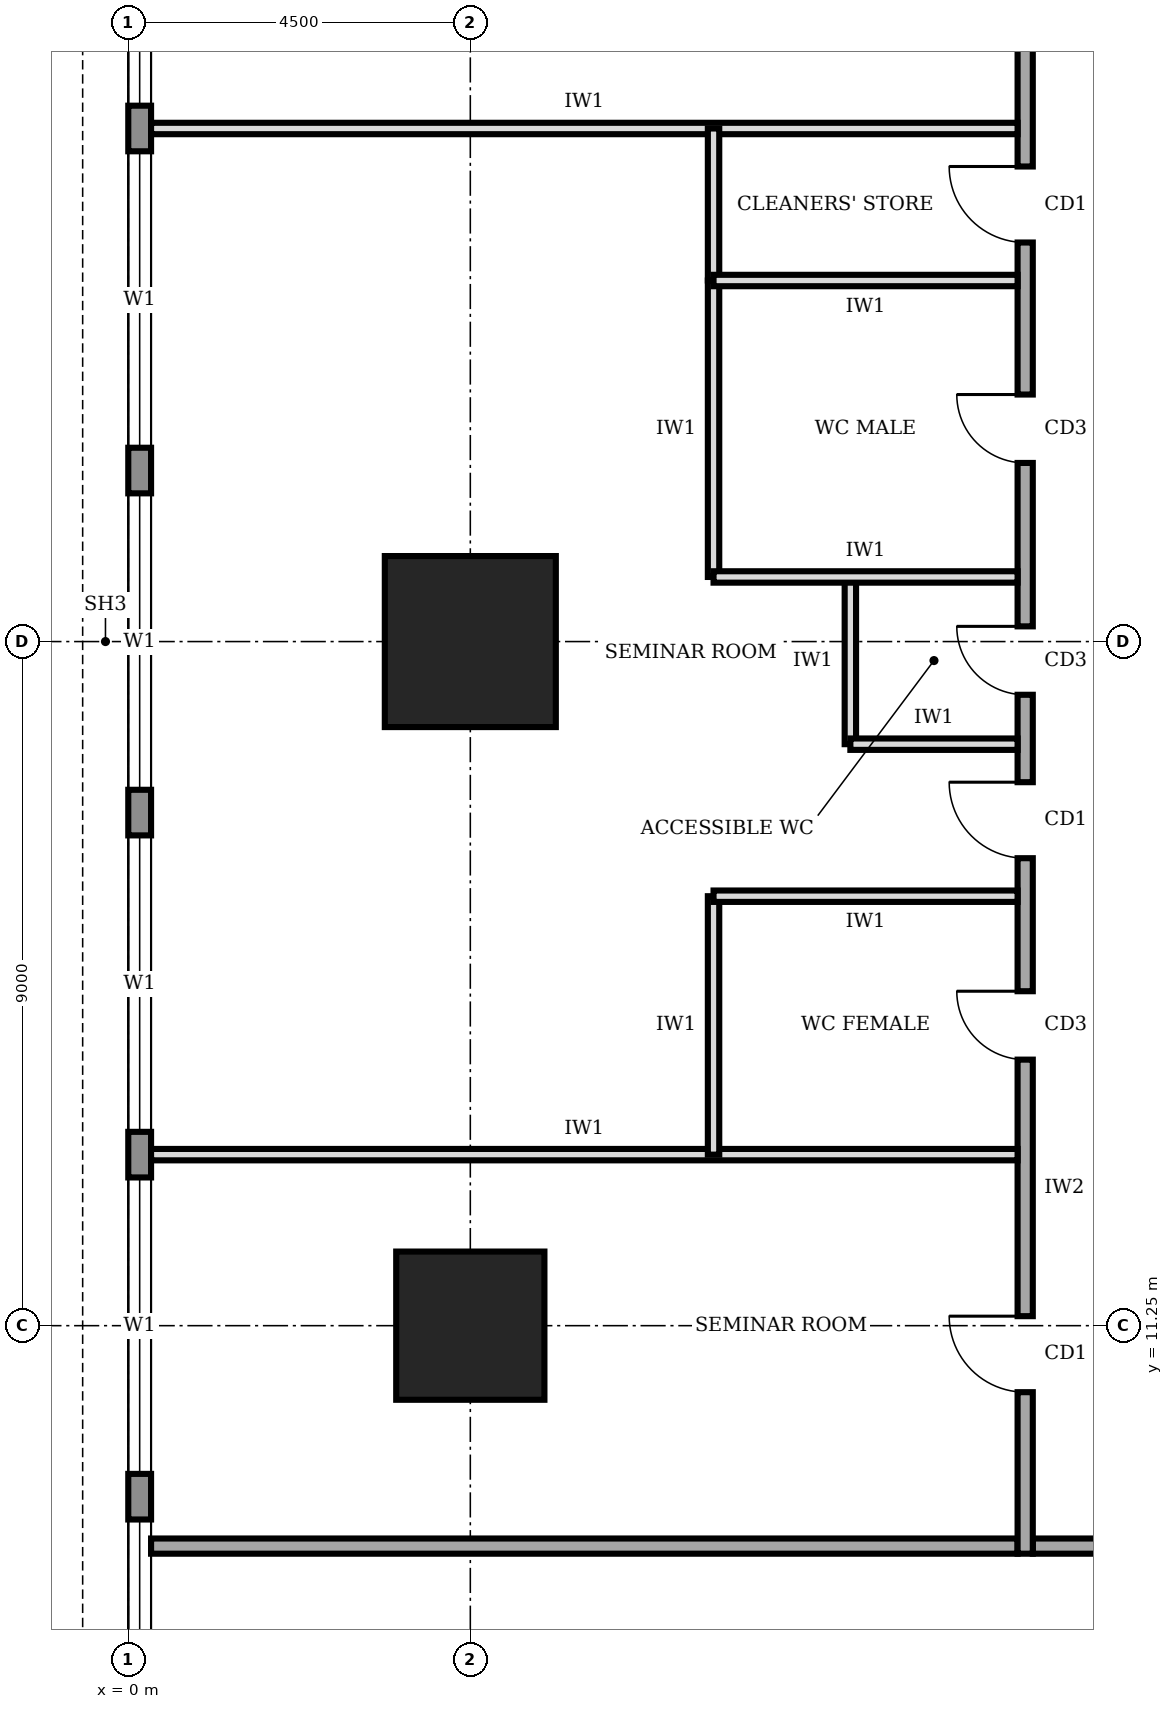
"""IFC4 building model, lengths in metres.
Left out: names, types, materials, properties, quantities, classifications, styles, units other than length and angle.
Written with IfcOpenShell. Run it as: python <this file> out.ifc"""

import sys

from ifc_helpers import new_model, si_unit, direction, frame, frame_2d, origin, origin_2d, place, context, subcontext, project, spatial, rectangle, extrude, element, fill, save


model = new_model("IFC4")
c1 = context("Model", 3, precision=1e-05, world=origin(), true_north=direction((0.0, 1.0)))
c2 = subcontext(c1, "Body", "Model", "MODEL_VIEW")
j1 = project(units=[si_unit("LENGTHUNIT", "METRE"), si_unit("PLANEANGLEUNIT", "RADIAN")], contexts=[c1])
p1 = place(None, origin())
s1 = spatial("IfcSite", under=j1, at=p1, CompositionType="ELEMENT")
p2 = place(p1, origin())
s2 = spatial("IfcBuilding", under=s1, at=p2, CompositionType="ELEMENT")
p3 = place(p2, frame((0.0, 0.0, 217.0)))
s3 = spatial("IfcBuildingStorey", under=s2, at=p3, CompositionType="ELEMENT", Elevation=217.0)
p4 = place(p3, frame((4.5, 11.25, 0.0), z_axis=(0.0, 0.0, 1.0), x_axis=(1.0, 0.0, 0.0)))
e1 = element("IfcColumn", 1, at=p4, inside=s3, PredefinedType="COLUMN", context=c2, shape_type="SweptSolid", body=[
    extrude(rectangle(XDim=1.95, YDim=1.95, at=origin_2d()), origin(), (0.0, 0.0, 1.0), 4.0),
])
p5 = place(p3, frame((4.5, 20.25, 0.0), z_axis=(0.0, 0.0, 1.0), x_axis=(1.0, 0.0, 0.0)))
e2 = element("IfcColumn", 2, at=p5, inside=s3, PredefinedType="COLUMN", context=c2, shape_type="SweptSolid", body=[
    extrude(rectangle(XDim=2.25, YDim=2.25, at=origin_2d()), origin(), (0.0, 0.0, 1.0), 4.0),
])
p6 = place(p3, frame((0.15, 35.98, 0.0), z_axis=(0.0, 0.0, 1.0), x_axis=(0.0, -1.0, 0.0)))
e3 = element("IfcWall", 3, at=p6, inside=s3, PredefinedType="STANDARD", context=c2, shape_type="SweptSolid", body=[
    extrude(rectangle(XDim=31.46, YDim=0.3, at=frame_2d((15.73, 0.0))), origin(), (0.0, 0.0, 1.0), 3.75),
])
p7 = place(p6, frame((27.28, 0.0, 0.9)))
e4 = element("IfcOpeningElement", 4, at=p7, cuts=e3, PredefinedType="OPENING", context=c2, shape_type="SweptSolid", body=[
    extrude(rectangle(XDim=3.9, YDim=2.2, at=frame_2d((1.95, 1.1))), frame((0.0, 0.16, 0.0), z_axis=(0.0, -1.0, 0.0), x_axis=(1.0, 0.0, 0.0)), (0.0, 0.0, 1.0), 0.32),
])
p8 = place(p6, frame((22.78, 0.0, 0.9)))
e5 = element("IfcOpeningElement", 5, at=p8, cuts=e3, PredefinedType="OPENING", context=c2, shape_type="SweptSolid", body=[
    extrude(rectangle(XDim=3.9, YDim=2.2, at=frame_2d((1.95, 1.1))), frame((0.0, 0.16, 0.0), z_axis=(0.0, -1.0, 0.0), x_axis=(1.0, 0.0, 0.0)), (0.0, 0.0, 1.0), 0.32),
])
p9 = place(p6, frame((18.28, 0.0, 0.9)))
e6 = element("IfcOpeningElement", 6, at=p9, cuts=e3, PredefinedType="OPENING", context=c2, shape_type="SweptSolid", body=[
    extrude(rectangle(XDim=3.9, YDim=2.2, at=frame_2d((1.95, 1.1))), frame((0.0, 0.16, 0.0), z_axis=(0.0, -1.0, 0.0), x_axis=(1.0, 0.0, 0.0)), (0.0, 0.0, 1.0), 0.32),
])
p10 = place(p6, frame((13.78, 0.0, 0.9)))
e7 = element("IfcOpeningElement", 7, at=p10, cuts=e3, PredefinedType="OPENING", context=c2, shape_type="SweptSolid", body=[
    extrude(rectangle(XDim=3.9, YDim=2.2, at=frame_2d((1.95, 1.1))), frame((0.0, 0.16, 0.0), z_axis=(0.0, -1.0, 0.0), x_axis=(1.0, 0.0, 0.0)), (0.0, 0.0, 1.0), 0.32),
])
p11 = place(p6, frame((9.28, 0.0, 0.9)))
e8 = element("IfcOpeningElement", 8, at=p11, cuts=e3, PredefinedType="OPENING", context=c2, shape_type="SweptSolid", body=[
    extrude(rectangle(XDim=3.9, YDim=2.2, at=frame_2d((1.95, 1.1))), frame((0.0, 0.16, 0.0), z_axis=(0.0, -1.0, 0.0), x_axis=(1.0, 0.0, 0.0)), (0.0, 0.0, 1.0), 0.32),
])
p12 = place(p6, frame((4.78, 0.0, 0.9)))
e9 = element("IfcOpeningElement", 9, at=p12, cuts=e3, PredefinedType="OPENING", context=c2, shape_type="SweptSolid", body=[
    extrude(rectangle(XDim=3.9, YDim=2.2, at=frame_2d((1.95, 1.1))), frame((0.0, 0.16, 0.0), z_axis=(0.0, -1.0, 0.0), x_axis=(1.0, 0.0, 0.0)), (0.0, 0.0, 1.0), 0.32),
])
p13 = place(p3, frame((11.9, 8.35, 0.0), z_axis=(0.0, 0.0, 1.0), x_axis=(1.0, 0.0, 0.0)))
e10 = element("IfcWall", 10, at=p13, inside=s3, PredefinedType="SOLIDWALL", context=c2, shape_type="SweptSolid", body=[
    extrude(rectangle(XDim=16.9, YDim=0.2, at=frame_2d((8.45, 0.0))), origin(), (0.0, 0.0, 1.0), 3.75),
])
p14 = place(p13, frame((2.05, 0.0, 0.0)))
e11 = element("IfcOpeningElement", 11, at=p14, cuts=e10, PredefinedType="OPENING", context=c2, shape_type="SweptSolid", body=[
    extrude(rectangle(XDim=1.8, YDim=2.1, at=frame_2d((0.9, 1.05))), frame((0.0, 0.11, 0.0), z_axis=(0.0, -1.0, 0.0), x_axis=(1.0, 0.0, 0.0)), (0.0, 0.0, 1.0), 0.22),
])
p15 = place(p13, frame((10.6, 0.0, 0.0)))
e12 = element("IfcOpeningElement", 12, at=p15, cuts=e10, PredefinedType="OPENING", context=c2, shape_type="SweptSolid", body=[
    extrude(rectangle(XDim=1.8, YDim=2.1, at=frame_2d((0.9, 1.05))), frame((0.0, 0.11, 0.0), z_axis=(0.0, -1.0, 0.0), x_axis=(1.0, 0.0, 0.0)), (0.0, 0.0, 1.0), 0.22),
])
p16 = place(p3, frame((11.8, 32.05, 0.0), z_axis=(0.0, 0.0, 1.0), x_axis=(0.0, -1.0, 0.0)))
e13 = element("IfcWall", 13, at=p16, inside=s3, PredefinedType="SOLIDWALL", context=c2, shape_type="SweptSolid", body=[
    extrude(rectangle(XDim=23.8, YDim=0.2, at=frame_2d((11.9, 0.0))), origin(), (0.0, 0.0, 1.0), 3.75),
])
p17 = place(p16, frame((20.675, 0.0, 0.0)))
e14 = element("IfcOpeningElement", 14, at=p17, cuts=e13, PredefinedType="OPENING", context=c2, shape_type="SweptSolid", body=[
    extrude(rectangle(XDim=1.0, YDim=2.1, at=frame_2d((0.5, 1.05))), frame((0.0, 0.11, 0.0), z_axis=(0.0, -1.0, 0.0), x_axis=(1.0, 0.0, 0.0)), (0.0, 0.0, 1.0), 0.22),
])
p18 = place(p16, frame((16.4, 0.0, 0.0)))
e15 = element("IfcOpeningElement", 15, at=p18, cuts=e13, PredefinedType="OPENING", context=c2, shape_type="SweptSolid", body=[
    extrude(rectangle(XDim=0.9, YDim=2.1, at=frame_2d((0.45, 1.05))), frame((0.0, 0.11, 0.0), z_axis=(0.0, -1.0, 0.0), x_axis=(1.0, 0.0, 0.0)), (0.0, 0.0, 1.0), 0.22),
])
p19 = place(p16, frame((11.6, 0.0, 0.0)))
e16 = element("IfcOpeningElement", 16, at=p19, cuts=e13, PredefinedType="OPENING", context=c2, shape_type="SweptSolid", body=[
    extrude(rectangle(XDim=0.9, YDim=2.1, at=frame_2d((0.45, 1.05))), frame((0.0, 0.11, 0.0), z_axis=(0.0, -1.0, 0.0), x_axis=(1.0, 0.0, 0.0)), (0.0, 0.0, 1.0), 0.22),
])
p20 = place(p16, frame((8.55, 0.0, 0.0)))
e17 = element("IfcOpeningElement", 17, at=p20, cuts=e13, PredefinedType="OPENING", context=c2, shape_type="SweptSolid", body=[
    extrude(rectangle(XDim=0.9, YDim=2.1, at=frame_2d((0.45, 1.05))), frame((0.0, 0.11, 0.0), z_axis=(0.0, -1.0, 0.0), x_axis=(1.0, 0.0, 0.0)), (0.0, 0.0, 1.0), 0.22),
])
p21 = place(p16, frame((5.55, 0.0, 0.0)))
e18 = element("IfcOpeningElement", 18, at=p21, cuts=e13, PredefinedType="OPENING", context=c2, shape_type="SweptSolid", body=[
    extrude(rectangle(XDim=1.0, YDim=2.1, at=frame_2d((0.5, 1.05))), frame((0.0, 0.11, 0.0), z_axis=(0.0, -1.0, 0.0), x_axis=(1.0, 0.0, 0.0)), (0.0, 0.0, 1.0), 0.22),
])
p22 = place(p16, frame((13.65, 0.0, 0.0)))
e19 = element("IfcOpeningElement", 19, at=p22, cuts=e13, PredefinedType="OPENING", context=c2, shape_type="SweptSolid", body=[
    extrude(rectangle(XDim=1.0, YDim=2.1, at=frame_2d((0.5, 1.05))), frame((0.0, 0.11, 0.0), z_axis=(0.0, -1.0, 0.0), x_axis=(1.0, 0.0, 0.0)), (0.0, 0.0, 1.0), 0.22),
])
p23 = place(p16, frame((1.925, 0.0, 0.0)))
e20 = element("IfcOpeningElement", 20, at=p23, cuts=e13, PredefinedType="OPENING", context=c2, shape_type="SweptSolid", body=[
    extrude(rectangle(XDim=1.0, YDim=2.1, at=frame_2d((0.5, 1.05))), frame((0.0, 0.11, 0.0), z_axis=(0.0, -1.0, 0.0), x_axis=(1.0, 0.0, 0.0)), (0.0, 0.0, 1.0), 0.22),
])
p24 = place(p3, frame((0.3, 8.35, 0.0), z_axis=(0.0, 0.0, 1.0), x_axis=(1.0, 0.0, 0.0)))
e21 = element("IfcWall", 21, at=p24, inside=s3, PredefinedType="SOLIDWALL", context=c2, shape_type="SweptSolid", body=[
    extrude(rectangle(XDim=11.4, YDim=0.2, at=frame_2d((5.7, 0.0))), origin(), (0.0, 0.0, 1.0), 3.75),
])
for number, where, z_axis, x_axis in (
    (22, (0.3, 13.5, 0.0), (0.0, 0.0, 1.0), (1.0, 0.0, 0.0)),
    (23, (0.3, 27.0, 0.0), (0.0, 0.0, 1.0), (1.0, 0.0, 0.0)),
):
    element("IfcWall", number, at=place(p3, frame(where, z_axis=z_axis, x_axis=x_axis)), inside=s3, PredefinedType="PARTITIONING", context=c2, shape_type="SweptSolid", body=[
        extrude(rectangle(XDim=11.4, YDim=0.15, at=frame_2d((5.7, 0.0))), origin(), (0.0, 0.0, 1.0), 3.75),
    ])
p25 = place(p3, frame((11.7, 16.9, 0.0), z_axis=(0.0, 0.0, 1.0), x_axis=(-1.0, 0.0, 0.0)))
e24 = element("IfcWall", 24, at=p25, inside=s3, PredefinedType="PARTITIONING", context=c2, shape_type="SweptSolid", body=[
    extrude(rectangle(XDim=4.0, YDim=0.15, at=frame_2d((2.0, 0.0))), origin(), (0.0, 0.0, 1.0), 3.75),
])
p26 = place(p3, frame((11.7, 18.9, 0.0), z_axis=(0.0, 0.0, 1.0), x_axis=(-1.0, 0.0, 0.0)))
e25 = element("IfcWall", 25, at=p26, inside=s3, PredefinedType="PARTITIONING", context=c2, shape_type="SweptSolid", body=[
    extrude(rectangle(XDim=2.2, YDim=0.15, at=frame_2d((1.1, 0.0))), origin(), (0.0, 0.0, 1.0), 3.75),
])
p27 = place(p3, frame((11.7, 21.1, 0.0), z_axis=(0.0, 0.0, 1.0), x_axis=(-1.0, 0.0, 0.0)))
e26 = element("IfcWall", 26, at=p27, inside=s3, PredefinedType="PARTITIONING", context=c2, shape_type="SweptSolid", body=[
    extrude(rectangle(XDim=4.0, YDim=0.15, at=frame_2d((2.0, 0.0))), origin(), (0.0, 0.0, 1.0), 2.85),
])
p28 = place(p3, frame((11.7, 25.0, 0.0), z_axis=(0.0, 0.0, 1.0), x_axis=(-1.0, 0.0, 0.0)))
e27 = element("IfcWall", 27, at=p28, inside=s3, PredefinedType="PARTITIONING", context=c2, shape_type="SweptSolid", body=[
    extrude(rectangle(XDim=4.0, YDim=0.15, at=frame_2d((2.0, 0.0))), origin(), (0.0, 0.0, 1.0), 3.75),
])
p29 = place(p3, frame((7.7, 13.5, 0.0), z_axis=(0.0, 0.0, 1.0), x_axis=(0.0, 1.0, 0.0)))
e28 = element("IfcWall", 28, at=p29, inside=s3, PredefinedType="PARTITIONING", context=c2, shape_type="SweptSolid", body=[
    extrude(rectangle(XDim=3.4, YDim=0.15, at=frame_2d((1.7, 0.0))), origin(), (0.0, 0.0, 1.0), 3.75),
])
p30 = place(p3, frame((9.5, 18.9, 0.0), z_axis=(0.0, 0.0, 1.0), x_axis=(0.0, 1.0, 0.0)))
e29 = element("IfcWall", 29, at=p30, inside=s3, PredefinedType="PARTITIONING", context=c2, shape_type="SweptSolid", body=[
    extrude(rectangle(XDim=2.2, YDim=0.15, at=frame_2d((1.1, 0.0))), origin(), (0.0, 0.0, 1.0), 3.75),
])
p31 = place(p3, frame((7.7, 21.1, 0.0), z_axis=(0.0, 0.0, 1.0), x_axis=(0.0, 1.0, 0.0)))
e30 = element("IfcWall", 30, at=p31, inside=s3, PredefinedType="PARTITIONING", context=c2, shape_type="SweptSolid", body=[
    extrude(rectangle(XDim=3.9, YDim=0.15, at=frame_2d((1.95, 0.0))), origin(), (0.0, 0.0, 1.0), 3.75),
])
p32 = place(p3, frame((7.7, 25.0, 0.0), z_axis=(0.0, 0.0, 1.0), x_axis=(0.0, 1.0, 0.0)))
e31 = element("IfcWall", 31, at=p32, inside=s3, PredefinedType="PARTITIONING", context=c2, shape_type="SweptSolid", body=[
    extrude(rectangle(XDim=2.0, YDim=0.15, at=frame_2d((1.0, 0.0))), origin(), (0.0, 0.0, 1.0), 3.75),
])
p33 = place(p7, origin())
e32 = element("IfcWindow", 32, at=p33, inside=s3, PartitioningType="SINGLE_PANEL", PredefinedType="WINDOW", context=c2, shape_type="SweptSolid", body=[
    extrude(rectangle(XDim=3.9, YDim=2.2, at=frame_2d((1.95, 1.1))), frame((0.0, 0.03, 0.0), z_axis=(0.0, -1.0, 0.0), x_axis=(1.0, 0.0, 0.0)), (0.0, 0.0, 1.0), 0.06),
])
fill(e4, e32)
p34 = place(p8, origin())
e33 = element("IfcWindow", 33, at=p34, inside=s3, PartitioningType="SINGLE_PANEL", PredefinedType="WINDOW", context=c2, shape_type="SweptSolid", body=[
    extrude(rectangle(XDim=3.9, YDim=2.2, at=frame_2d((1.95, 1.1))), frame((0.0, 0.03, 0.0), z_axis=(0.0, -1.0, 0.0), x_axis=(1.0, 0.0, 0.0)), (0.0, 0.0, 1.0), 0.06),
])
fill(e5, e33)
p35 = place(p9, origin())
e34 = element("IfcWindow", 34, at=p35, inside=s3, PartitioningType="SINGLE_PANEL", PredefinedType="WINDOW", context=c2, shape_type="SweptSolid", body=[
    extrude(rectangle(XDim=3.9, YDim=2.2, at=frame_2d((1.95, 1.1))), frame((0.0, 0.03, 0.0), z_axis=(0.0, -1.0, 0.0), x_axis=(1.0, 0.0, 0.0)), (0.0, 0.0, 1.0), 0.06),
])
fill(e6, e34)
p36 = place(p10, origin())
e35 = element("IfcWindow", 35, at=p36, inside=s3, PartitioningType="SINGLE_PANEL", PredefinedType="WINDOW", context=c2, shape_type="SweptSolid", body=[
    extrude(rectangle(XDim=3.9, YDim=2.2, at=frame_2d((1.95, 1.1))), frame((0.0, 0.03, 0.0), z_axis=(0.0, -1.0, 0.0), x_axis=(1.0, 0.0, 0.0)), (0.0, 0.0, 1.0), 0.06),
])
fill(e7, e35)
p37 = place(p11, origin())
e36 = element("IfcWindow", 36, at=p37, inside=s3, PartitioningType="SINGLE_PANEL", PredefinedType="WINDOW", context=c2, shape_type="SweptSolid", body=[
    extrude(rectangle(XDim=3.9, YDim=2.2, at=frame_2d((1.95, 1.1))), frame((0.0, 0.03, 0.0), z_axis=(0.0, -1.0, 0.0), x_axis=(1.0, 0.0, 0.0)), (0.0, 0.0, 1.0), 0.06),
])
fill(e8, e36)
p38 = place(p12, origin())
e37 = element("IfcWindow", 37, at=p38, inside=s3, PartitioningType="SINGLE_PANEL", PredefinedType="WINDOW", context=c2, shape_type="SweptSolid", body=[
    extrude(rectangle(XDim=3.9, YDim=2.2, at=frame_2d((1.95, 1.1))), frame((0.0, 0.03, 0.0), z_axis=(0.0, -1.0, 0.0), x_axis=(1.0, 0.0, 0.0)), (0.0, 0.0, 1.0), 0.06),
])
fill(e9, e37)
p39 = place(p17, frame((1.0, 0.0, 0.0), z_axis=(0.0, 0.0, 1.0), x_axis=(-1.0, 0.0, 0.0)))
e38 = element("IfcDoor", 38, at=p39, inside=s3, OperationType="SINGLE_SWING_RIGHT", PredefinedType="DOOR", context=c2, shape_type="SweptSolid", body=[
    extrude(rectangle(XDim=1.0, YDim=2.1, at=frame_2d((0.5, 1.05))), frame((0.0, 0.025, 0.0), z_axis=(0.0, -1.0, 0.0), x_axis=(1.0, 0.0, 0.0)), (0.0, 0.0, 1.0), 0.05),
])
fill(e14, e38)
p40 = place(p18, frame((0.9, 0.0, 0.0), z_axis=(0.0, 0.0, 1.0), x_axis=(-1.0, 0.0, 0.0)))
e39 = element("IfcDoor", 39, at=p40, inside=s3, OperationType="SINGLE_SWING_RIGHT", PredefinedType="DOOR", context=c2, shape_type="SweptSolid", body=[
    extrude(rectangle(XDim=0.9, YDim=2.1, at=frame_2d((0.45, 1.05))), frame((0.0, 0.025, 0.0), z_axis=(0.0, -1.0, 0.0), x_axis=(1.0, 0.0, 0.0)), (0.0, 0.0, 1.0), 0.05),
])
fill(e15, e39)
p41 = place(p19, frame((0.9, 0.0, 0.0), z_axis=(0.0, 0.0, 1.0), x_axis=(-1.0, 0.0, 0.0)))
e40 = element("IfcDoor", 40, at=p41, inside=s3, OperationType="SINGLE_SWING_RIGHT", PredefinedType="DOOR", context=c2, shape_type="SweptSolid", body=[
    extrude(rectangle(XDim=0.9, YDim=2.1, at=frame_2d((0.45, 1.05))), frame((0.0, 0.025, 0.0), z_axis=(0.0, -1.0, 0.0), x_axis=(1.0, 0.0, 0.0)), (0.0, 0.0, 1.0), 0.05),
])
fill(e16, e40)
p42 = place(p20, frame((0.9, 0.0, 0.0), z_axis=(0.0, 0.0, 1.0), x_axis=(-1.0, 0.0, 0.0)))
e41 = element("IfcDoor", 41, at=p42, inside=s3, OperationType="SINGLE_SWING_RIGHT", PredefinedType="DOOR", context=c2, shape_type="SweptSolid", body=[
    extrude(rectangle(XDim=0.9, YDim=2.1, at=frame_2d((0.45, 1.05))), frame((0.0, 0.025, 0.0), z_axis=(0.0, -1.0, 0.0), x_axis=(1.0, 0.0, 0.0)), (0.0, 0.0, 1.0), 0.05),
])
fill(e17, e41)
p43 = place(p21, frame((1.0, 0.0, 0.0), z_axis=(0.0, 0.0, 1.0), x_axis=(-1.0, 0.0, 0.0)))
e42 = element("IfcDoor", 42, at=p43, inside=s3, OperationType="SINGLE_SWING_RIGHT", PredefinedType="DOOR", context=c2, shape_type="SweptSolid", body=[
    extrude(rectangle(XDim=1.0, YDim=2.1, at=frame_2d((0.5, 1.05))), frame((0.0, 0.025, 0.0), z_axis=(0.0, -1.0, 0.0), x_axis=(1.0, 0.0, 0.0)), (0.0, 0.0, 1.0), 0.05),
])
fill(e18, e42)
p44 = place(p22, frame((1.0, 0.0, 0.0), z_axis=(0.0, 0.0, 1.0), x_axis=(-1.0, 0.0, 0.0)))
e43 = element("IfcDoor", 43, at=p44, inside=s3, OperationType="SINGLE_SWING_RIGHT", PredefinedType="DOOR", context=c2, shape_type="SweptSolid", body=[
    extrude(rectangle(XDim=1.0, YDim=2.1, at=frame_2d((0.5, 1.05))), frame((0.0, 0.025, 0.0), z_axis=(0.0, -1.0, 0.0), x_axis=(1.0, 0.0, 0.0)), (0.0, 0.0, 1.0), 0.05),
])
fill(e19, e43)
save(model, sys.argv[1])
